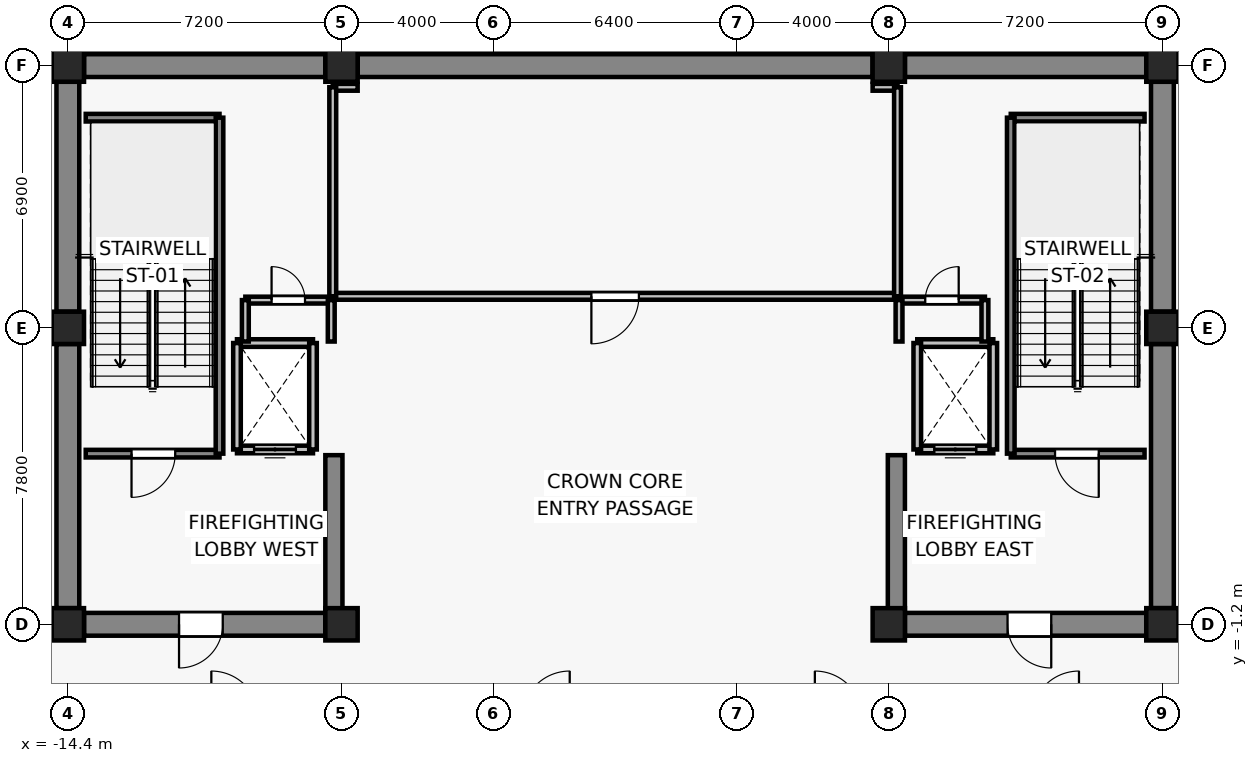
"""IFC4 building model, lengths in metres.
Left out: names, types, materials, properties, quantities, classifications, styles, units other than length and angle.
Written with IfcOpenShell. Run it as: python <this file> out.ifc"""

import sys

from ifc_helpers import new_model, si_unit, direction, frame, frame_2d, origin, origin_2d, place, context, subcontext, project, spatial, rectangle, extrude, source, transform, mapped, element, fill, save


model = new_model("IFC4")
c1 = context("Model", 3, precision=1e-05, world=origin(), true_north=direction((0.0, 1.0)))
c2 = subcontext(c1, "Body", "Model", "MODEL_VIEW")
j1 = project(units=[si_unit("LENGTHUNIT", "METRE"), si_unit("PLANEANGLEUNIT", "RADIAN")], contexts=[c1])
p1 = place(None, origin())
s1 = spatial("IfcSite", under=j1, at=p1, CompositionType="ELEMENT")
p2 = place(p1, origin())
s2 = spatial("IfcBuilding", under=s1, at=p2, CompositionType="ELEMENT")
p3 = place(p2, frame((0.0, 0.0, 276.2)))
s3 = spatial("IfcBuildingStorey", under=s2, at=p3, CompositionType="ELEMENT", Elevation=276.2)
for number, where, z_axis, x_axis in (
    (1, (-14.4, -1.2, 0.0), (0.0, 0.0, 1.0), (1.0, 0.0, 0.0)),
    (2, (-7.2, -1.2, 0.0), (0.0, 0.0, 1.0), (1.0, 0.0, 0.0)),
    (3, (7.2, -1.2, 0.0), (0.0, 0.0, 1.0), (1.0, 0.0, 0.0)),
    (4, (14.4, -1.2, 0.0), (0.0, 0.0, 1.0), (1.0, 0.0, 0.0)),
    (5, (-14.4, 6.6, 0.0), (0.0, 0.0, 1.0), (1.0, 0.0, 0.0)),
    (6, (14.4, 6.6, 0.0), (0.0, 0.0, 1.0), (1.0, 0.0, 0.0)),
    (7, (-14.4, 13.5, 0.0), (0.0, 0.0, 1.0), (1.0, 0.0, 0.0)),
    (8, (-7.2, 13.5, 0.0), (0.0, 0.0, 1.0), (1.0, 0.0, 0.0)),
    (9, (7.2, 13.5, 0.0), (0.0, 0.0, 1.0), (1.0, 0.0, 0.0)),
    (10, (14.4, 13.5, 0.0), (0.0, 0.0, 1.0), (1.0, 0.0, 0.0)),
):
    element("IfcColumn", number, at=place(p3, frame(where, z_axis=z_axis, x_axis=x_axis)), inside=s3, PredefinedType="COLUMN", context=c2, shape_type="SweptSolid", body=[
        extrude(rectangle(XDim=0.85, YDim=0.85, at=origin_2d()), origin(), (0.0, 0.0, 1.0), 4.6),
    ])
p4 = place(p3, frame((-13.975, 13.5, 0.0), z_axis=(0.0, 0.0, 1.0), x_axis=(1.0, 0.0, 0.0)))
e11 = element("IfcWall", 11, at=p4, inside=s3, PredefinedType="SHEAR", context=c2, shape_type="SweptSolid", body=[
    extrude(rectangle(XDim=6.35, YDim=0.6, at=frame_2d((3.175, 0.0))), origin(), (0.0, 0.0, 1.0), 4.38),
])
p5 = place(p3, frame((-6.775, 13.5, 0.0), z_axis=(0.0, 0.0, 1.0), x_axis=(1.0, 0.0, 0.0)))
e12 = element("IfcWall", 12, at=p5, inside=s3, PredefinedType="SHEAR", context=c2, shape_type="SweptSolid", body=[
    extrude(rectangle(XDim=13.55, YDim=0.6, at=frame_2d((6.775, 0.0))), origin(), (0.0, 0.0, 1.0), 4.38),
])
p6 = place(p3, frame((7.625, 13.5, 0.0), z_axis=(0.0, 0.0, 1.0), x_axis=(1.0, 0.0, 0.0)))
e13 = element("IfcWall", 13, at=p6, inside=s3, PredefinedType="SHEAR", context=c2, shape_type="SweptSolid", body=[
    extrude(rectangle(XDim=6.35, YDim=0.6, at=frame_2d((3.175, 0.0))), origin(), (0.0, 0.0, 1.0), 4.38),
])
p7 = place(p3, frame((-14.4, -0.775, 0.0), z_axis=(0.0, 0.0, 1.0), x_axis=(0.0, 1.0, 0.0)))
e14 = element("IfcWall", 14, at=p7, inside=s3, PredefinedType="SHEAR", context=c2, shape_type="SweptSolid", body=[
    extrude(rectangle(XDim=6.95, YDim=0.6, at=frame_2d((3.475, 0.0))), origin(), (0.0, 0.0, 1.0), 4.38),
])
p8 = place(p3, frame((-14.4, 7.025, 0.0), z_axis=(0.0, 0.0, 1.0), x_axis=(0.0, 1.0, 0.0)))
e15 = element("IfcWall", 15, at=p8, inside=s3, PredefinedType="SHEAR", context=c2, shape_type="SweptSolid", body=[
    extrude(rectangle(XDim=6.05, YDim=0.6, at=frame_2d((3.025, 0.0))), origin(), (0.0, 0.0, 1.0), 4.38),
])
p9 = place(p3, frame((14.4, -0.775, 0.0), z_axis=(0.0, 0.0, 1.0), x_axis=(0.0, 1.0, 0.0)))
e16 = element("IfcWall", 16, at=p9, inside=s3, PredefinedType="SHEAR", context=c2, shape_type="SweptSolid", body=[
    extrude(rectangle(XDim=6.95, YDim=0.6, at=frame_2d((3.475, 0.0))), origin(), (0.0, 0.0, 1.0), 4.38),
])
p10 = place(p3, frame((14.4, 7.025, 0.0), z_axis=(0.0, 0.0, 1.0), x_axis=(0.0, 1.0, 0.0)))
e17 = element("IfcWall", 17, at=p10, inside=s3, PredefinedType="SHEAR", context=c2, shape_type="SweptSolid", body=[
    extrude(rectangle(XDim=6.05, YDim=0.6, at=frame_2d((3.025, 0.0))), origin(), (0.0, 0.0, 1.0), 4.38),
])
p11 = place(p3, frame((-7.625, -1.2, 0.0), z_axis=(0.0, 0.0, 1.0), x_axis=(-1.0, 0.0, 0.0)))
e18 = element("IfcWall", 18, at=p11, inside=s3, PredefinedType="SHEAR", context=c2, shape_type="SweptSolid", body=[
    extrude(rectangle(XDim=6.35, YDim=0.6, at=frame_2d((3.175, 0.0))), origin(), (0.0, 0.0, 1.0), 4.38),
])
p12 = place(p11, frame((2.7, 0.0, 0.0)))
e19 = element("IfcOpeningElement", 19, at=p12, cuts=e18, PredefinedType="OPENING", context=c2, shape_type="SweptSolid", body=[
    extrude(rectangle(XDim=1.15, YDim=2.15, at=frame_2d((0.575, 1.075))), frame((0.0, 0.31, 0.0), z_axis=(0.0, -1.0, 0.0), x_axis=(1.0, 0.0, 0.0)), (0.0, 0.0, 1.0), 0.62),
])
p13 = place(p3, frame((13.975, -1.2, 0.0), z_axis=(0.0, 0.0, 1.0), x_axis=(-1.0, 0.0, 0.0)))
e20 = element("IfcWall", 20, at=p13, inside=s3, PredefinedType="SHEAR", context=c2, shape_type="SweptSolid", body=[
    extrude(rectangle(XDim=6.35, YDim=0.6, at=frame_2d((3.175, 0.0))), origin(), (0.0, 0.0, 1.0), 4.38),
])
p14 = place(p13, frame((2.5, 0.0, 0.0)))
e21 = element("IfcOpeningElement", 21, at=p14, cuts=e20, PredefinedType="OPENING", context=c2, shape_type="SweptSolid", body=[
    extrude(rectangle(XDim=1.15, YDim=2.15, at=frame_2d((0.575, 1.075))), frame((0.0, 0.31, 0.0), z_axis=(0.0, -1.0, 0.0), x_axis=(1.0, 0.0, 0.0)), (0.0, 0.0, 1.0), 0.62),
])
for number, where, z_axis, x_axis in (
    (22, (-7.4, -0.9, 0.0), (0.0, 0.0, 1.0), (0.0, 1.0, 0.0)),
    (23, (7.4, -0.9, 0.0), (0.0, 0.0, 1.0), (0.0, 1.0, 0.0)),
):
    element("IfcWall", number, at=place(p3, frame(where, z_axis=z_axis, x_axis=x_axis)), inside=s3, PredefinedType="SHEAR", context=c2, shape_type="SweptSolid", body=[
        extrude(rectangle(XDim=4.15, YDim=0.45, at=frame_2d((2.075, 0.0))), origin(), (0.0, 0.0, 1.0), 4.38),
    ])
p15 = place(p3, frame((-7.95, 3.4, 0.0), z_axis=(0.0, 0.0, 1.0), x_axis=(-1.0, 0.0, 0.0)))
e24 = element("IfcWall", 24, at=p15, inside=s3, PredefinedType="SOLIDWALL", context=c2, shape_type="SweptSolid", body=[
    extrude(rectangle(XDim=2.0, YDim=0.2, at=frame_2d((1.0, 0.0))), origin(), (0.0, 0.0, 1.0), 4.38),
])
p16 = place(p15, frame((0.45, 0.0, 0.0)))
e25 = element("IfcOpeningElement", 25, at=p16, cuts=e24, PredefinedType="OPENING", context=c2, shape_type="SweptSolid", body=[
    extrude(rectangle(XDim=1.1, YDim=2.2, at=frame_2d((0.55, 1.1))), frame((0.0, 0.11, 0.0), z_axis=(0.0, -1.0, 0.0), x_axis=(1.0, 0.0, 0.0)), (0.0, 0.0, 1.0), 0.22),
])
p17 = place(p3, frame((-9.95, 6.2, 0.0), z_axis=(0.0, 0.0, 1.0), x_axis=(1.0, 0.0, 0.0)))
e26 = element("IfcWall", 26, at=p17, inside=s3, PredefinedType="SOLIDWALL", context=c2, shape_type="SweptSolid", body=[
    extrude(rectangle(XDim=2.0, YDim=0.2, at=frame_2d((1.0, 0.0))), origin(), (0.0, 0.0, 1.0), 4.38),
])
for number, where, z_axis, x_axis in (
    (27, (-9.95, 3.4, 0.0), (0.0, 0.0, 1.0), (0.0, 1.0, 0.0)),
    (28, (-7.95, 6.2, 0.0), (0.0, 0.0, 1.0), (0.0, -1.0, 0.0)),
):
    element("IfcWall", number, at=place(p3, frame(where, z_axis=z_axis, x_axis=x_axis)), inside=s3, PredefinedType="SOLIDWALL", context=c2, shape_type="SweptSolid", body=[
        extrude(rectangle(XDim=2.8, YDim=0.2, at=frame_2d((1.4, 0.0))), origin(), (0.0, 0.0, 1.0), 4.38),
    ])
p18 = place(p3, frame((9.95, 3.4, 0.0), z_axis=(0.0, 0.0, 1.0), x_axis=(-1.0, 0.0, 0.0)))
e29 = element("IfcWall", 29, at=p18, inside=s3, PredefinedType="SOLIDWALL", context=c2, shape_type="SweptSolid", body=[
    extrude(rectangle(XDim=2.0, YDim=0.2, at=frame_2d((1.0, 0.0))), origin(), (0.0, 0.0, 1.0), 4.38),
])
p19 = place(p18, frame((0.45, 0.0, 0.0)))
e30 = element("IfcOpeningElement", 30, at=p19, cuts=e29, PredefinedType="OPENING", context=c2, shape_type="SweptSolid", body=[
    extrude(rectangle(XDim=1.1, YDim=2.2, at=frame_2d((0.55, 1.1))), frame((0.0, 0.11, 0.0), z_axis=(0.0, -1.0, 0.0), x_axis=(1.0, 0.0, 0.0)), (0.0, 0.0, 1.0), 0.22),
])
p20 = place(p3, frame((7.95, 6.2, 0.0), z_axis=(0.0, 0.0, 1.0), x_axis=(1.0, 0.0, 0.0)))
e31 = element("IfcWall", 31, at=p20, inside=s3, PredefinedType="SOLIDWALL", context=c2, shape_type="SweptSolid", body=[
    extrude(rectangle(XDim=2.0, YDim=0.2, at=frame_2d((1.0, 0.0))), origin(), (0.0, 0.0, 1.0), 4.38),
])
for number, where, z_axis, x_axis in (
    (32, (7.95, 3.4, 0.0), (0.0, 0.0, 1.0), (0.0, 1.0, 0.0)),
    (33, (9.95, 6.2, 0.0), (0.0, 0.0, 1.0), (0.0, -1.0, 0.0)),
):
    element("IfcWall", number, at=place(p3, frame(where, z_axis=z_axis, x_axis=x_axis)), inside=s3, PredefinedType="SOLIDWALL", context=c2, shape_type="SweptSolid", body=[
        extrude(rectangle(XDim=2.8, YDim=0.2, at=frame_2d((1.4, 0.0))), origin(), (0.0, 0.0, 1.0), 4.38),
    ])
p21 = place(p3, frame((-10.41, 3.29, 0.0), z_axis=(0.0, 0.0, 1.0), x_axis=(-1.0, 0.0, 0.0)))
e34 = element("IfcWall", 34, at=p21, inside=s3, PredefinedType="SOLIDWALL", context=c2, shape_type="SweptSolid", body=[
    extrude(rectangle(XDim=3.52, YDim=0.2, at=frame_2d((1.76, 0.0))), origin(), (0.0, 0.0, 1.0), 4.38),
])
p22 = place(p21, frame((1.165, 0.0, 0.0)))
e35 = element("IfcOpeningElement", 35, at=p22, cuts=e34, PredefinedType="OPENING", context=c2, shape_type="SweptSolid", body=[
    extrude(rectangle(XDim=1.15, YDim=2.15, at=frame_2d((0.575, 1.075))), frame((0.0, 0.11, 0.0), z_axis=(0.0, -1.0, 0.0), x_axis=(1.0, 0.0, 0.0)), (0.0, 0.0, 1.0), 0.22),
])
p23 = place(p3, frame((-13.93, 12.13, 0.0), z_axis=(0.0, 0.0, 1.0), x_axis=(1.0, 0.0, 0.0)))
e36 = element("IfcWall", 36, at=p23, inside=s3, PredefinedType="SOLIDWALL", context=c2, shape_type="SweptSolid", body=[
    extrude(rectangle(XDim=3.52, YDim=0.2, at=frame_2d((1.76, 0.0))), origin(), (0.0, 0.0, 1.0), 4.38),
])
p24 = place(p3, frame((-10.41, 12.13, 0.0), z_axis=(0.0, 0.0, 1.0), x_axis=(0.0, -1.0, 0.0)))
e37 = element("IfcWall", 37, at=p24, inside=s3, PredefinedType="SOLIDWALL", context=c2, shape_type="SweptSolid", body=[
    extrude(rectangle(XDim=8.84, YDim=0.2, at=frame_2d((4.42, 0.0))), origin(), (0.0, 0.0, 1.0), 4.38),
])
p25 = place(p3, frame((13.93, 3.29, 0.0), z_axis=(0.0, 0.0, 1.0), x_axis=(-1.0, 0.0, 0.0)))
e38 = element("IfcWall", 38, at=p25, inside=s3, PredefinedType="SOLIDWALL", context=c2, shape_type="SweptSolid", body=[
    extrude(rectangle(XDim=3.52, YDim=0.2, at=frame_2d((1.76, 0.0))), origin(), (0.0, 0.0, 1.0), 4.38),
])
p26 = place(p25, frame((1.205, 0.0, 0.0)))
e39 = element("IfcOpeningElement", 39, at=p26, cuts=e38, PredefinedType="OPENING", context=c2, shape_type="SweptSolid", body=[
    extrude(rectangle(XDim=1.15, YDim=2.15, at=frame_2d((0.575, 1.075))), frame((0.0, 0.11, 0.0), z_axis=(0.0, -1.0, 0.0), x_axis=(1.0, 0.0, 0.0)), (0.0, 0.0, 1.0), 0.22),
])
p27 = place(p3, frame((10.41, 12.13, 0.0), z_axis=(0.0, 0.0, 1.0), x_axis=(1.0, 0.0, 0.0)))
e40 = element("IfcWall", 40, at=p27, inside=s3, PredefinedType="SOLIDWALL", context=c2, shape_type="SweptSolid", body=[
    extrude(rectangle(XDim=3.52, YDim=0.2, at=frame_2d((1.76, 0.0))), origin(), (0.0, 0.0, 1.0), 4.38),
])
p28 = place(p3, frame((10.41, 3.29, 0.0), z_axis=(0.0, 0.0, 1.0), x_axis=(0.0, 1.0, 0.0)))
e41 = element("IfcWall", 41, at=p28, inside=s3, PredefinedType="SOLIDWALL", context=c2, shape_type="SweptSolid", body=[
    extrude(rectangle(XDim=8.84, YDim=0.2, at=frame_2d((4.42, 0.0))), origin(), (0.0, 0.0, 1.0), 4.38),
])
p29 = place(p3, frame((7.43, 7.43, 0.0), z_axis=(0.0, 0.0, 1.0), x_axis=(-1.0, 0.0, 0.0)))
e42 = element("IfcWall", 42, at=p29, inside=s3, PredefinedType="PARTITIONING", context=c2, shape_type="SweptSolid", body=[
    extrude(rectangle(XDim=14.86, YDim=0.18, at=frame_2d((7.43, 0.0))), origin(), (0.0, 0.0, 1.0), 3.77),
])
p30 = place(p29, frame((6.805, 0.0, 0.0)))
e43 = element("IfcOpeningElement", 43, at=p30, cuts=e42, PredefinedType="OPENING", context=c2, shape_type="SweptSolid", body=[
    extrude(rectangle(XDim=1.25, YDim=2.15, at=frame_2d((0.625, 1.075))), frame((0.0, 0.1, 0.0), z_axis=(0.0, -1.0, 0.0), x_axis=(1.0, 0.0, 0.0)), (0.0, 0.0, 1.0), 0.2),
])
for number, where, z_axis, x_axis in (
    (44, (-7.43, 12.93, 0.0), (0.0, 0.0, 1.0), (1.0, 0.0, 0.0)),
    (45, (6.775, 12.93, 0.0), (0.0, 0.0, 1.0), (1.0, 0.0, 0.0)),
):
    element("IfcWall", number, at=place(p3, frame(where, z_axis=z_axis, x_axis=x_axis)), inside=s3, PredefinedType="PARTITIONING", context=c2, shape_type="SweptSolid", body=[
        extrude(rectangle(XDim=0.655, YDim=0.18, at=frame_2d((0.328, 0.0))), origin(), (0.0, 0.0, 1.0), 3.77),
    ])
for number, where, z_axis, x_axis in (
    (46, (-7.43, 7.43, 0.0), (0.0, 0.0, 1.0), (0.0, 1.0, 0.0)),
    (47, (7.43, 12.93, 0.0), (0.0, 0.0, 1.0), (0.0, -1.0, 0.0)),
):
    element("IfcWall", number, at=place(p3, frame(where, z_axis=z_axis, x_axis=x_axis)), inside=s3, PredefinedType="PARTITIONING", context=c2, shape_type="SweptSolid", body=[
        extrude(rectangle(XDim=5.5, YDim=0.18, at=frame_2d((2.75, 0.0))), origin(), (0.0, 0.0, 1.0), 3.77),
    ])
p31 = place(p3, frame((-9.73, 7.33, 0.0), z_axis=(0.0, 0.0, 1.0), x_axis=(1.0, 0.0, 0.0)))
e48 = element("IfcWall", 48, at=p31, inside=s3, PredefinedType="PARTITIONING", context=c2, shape_type="SweptSolid", body=[
    extrude(rectangle(XDim=2.26, YDim=0.18, at=frame_2d((1.13, 0.0))), origin(), (0.0, 0.0, 1.0), 3.77),
])
p32 = place(p31, frame((0.69, 0.0, 0.0)))
e49 = element("IfcOpeningElement", 49, at=p32, cuts=e48, PredefinedType="OPENING", context=c2, shape_type="SweptSolid", body=[
    extrude(rectangle(XDim=0.88, YDim=2.1, at=frame_2d((0.44, 1.05))), frame((0.0, 0.1, 0.0), z_axis=(0.0, -1.0, 0.0), x_axis=(1.0, 0.0, 0.0)), (0.0, 0.0, 1.0), 0.2),
])
p33 = place(p3, frame((-9.73, 6.24, 0.0), z_axis=(0.0, 0.0, 1.0), x_axis=(0.0, 1.0, 0.0)))
e50 = element("IfcWall", 50, at=p33, inside=s3, PredefinedType="PARTITIONING", context=c2, shape_type="SweptSolid", body=[
    extrude(rectangle(XDim=1.09, YDim=0.18, at=frame_2d((0.545, 0.0))), origin(), (0.0, 0.0, 1.0), 4.38),
])
p34 = place(p3, frame((-7.47, 7.33, 0.0), z_axis=(0.0, 0.0, 1.0), x_axis=(0.0, -1.0, 0.0)))
e51 = element("IfcWall", 51, at=p34, inside=s3, PredefinedType="PARTITIONING", context=c2, shape_type="SweptSolid", body=[
    extrude(rectangle(XDim=1.09, YDim=0.18, at=frame_2d((0.545, 0.0))), origin(), (0.0, 0.0, 1.0), 3.77),
])
p35 = place(p3, frame((7.47, 7.33, 0.0), z_axis=(0.0, 0.0, 1.0), x_axis=(1.0, 0.0, 0.0)))
e52 = element("IfcWall", 52, at=p35, inside=s3, PredefinedType="PARTITIONING", context=c2, shape_type="SweptSolid", body=[
    extrude(rectangle(XDim=2.26, YDim=0.18, at=frame_2d((1.13, 0.0))), origin(), (0.0, 0.0, 1.0), 3.77),
])
p36 = place(p35, frame((0.69, 0.0, 0.0)))
e53 = element("IfcOpeningElement", 53, at=p36, cuts=e52, PredefinedType="OPENING", context=c2, shape_type="SweptSolid", body=[
    extrude(rectangle(XDim=0.88, YDim=2.1, at=frame_2d((0.44, 1.05))), frame((0.0, 0.1, 0.0), z_axis=(0.0, -1.0, 0.0), x_axis=(1.0, 0.0, 0.0)), (0.0, 0.0, 1.0), 0.2),
])
p37 = place(p3, frame((7.47, 6.24, 0.0), z_axis=(0.0, 0.0, 1.0), x_axis=(0.0, 1.0, 0.0)))
e54 = element("IfcWall", 54, at=p37, inside=s3, PredefinedType="PARTITIONING", context=c2, shape_type="SweptSolid", body=[
    extrude(rectangle(XDim=1.09, YDim=0.18, at=frame_2d((0.545, 0.0))), origin(), (0.0, 0.0, 1.0), 3.77),
])
p38 = place(p3, frame((9.73, 7.33, 0.0), z_axis=(0.0, 0.0, 1.0), x_axis=(0.0, -1.0, 0.0)))
e55 = element("IfcWall", 55, at=p38, inside=s3, PredefinedType="PARTITIONING", context=c2, shape_type="SweptSolid", body=[
    extrude(rectangle(XDim=1.09, YDim=0.18, at=frame_2d((0.545, 0.0))), origin(), (0.0, 0.0, 1.0), 4.38),
])
m1 = source(origin(), c2, "Body", "SweptSolid", [
    extrude(rectangle(XDim=1.1, YDim=2.2, at=frame_2d((0.55, 1.1))), frame((0.0, 0.025, 0.0), z_axis=(0.0, -1.0, 0.0), x_axis=(1.0, 0.0, 0.0)), (0.0, 0.0, 1.0), 0.05),
])
p39 = place(p16, origin())
e56 = element("IfcDoor", 56, at=p39, inside=s3, OperationType="DOUBLE_DOOR_SLIDING", PredefinedType="DOOR", context=c2, shape_type="MappedRepresentation", body=[
    mapped(m1, transform((0.0, 0.0, 0.0), x_axis=(1.0, 0.0, 0.0), y_axis=(0.0, 1.0, 0.0), z_axis=(0.0, 0.0, 1.0), scale=1.0)),
])
fill(e25, e56)
p40 = place(p19, origin())
e57 = element("IfcDoor", 57, at=p40, inside=s3, OperationType="DOUBLE_DOOR_SLIDING", PredefinedType="DOOR", context=c2, shape_type="MappedRepresentation", body=[
    mapped(m1, transform((0.0, 0.0, 0.0), x_axis=(1.0, 0.0, 0.0), y_axis=(0.0, 1.0, 0.0), z_axis=(0.0, 0.0, 1.0), scale=1.0)),
])
fill(e30, e57)
m2 = source(origin(), c2, "Body", "SweptSolid", [
    extrude(rectangle(XDim=1.15, YDim=2.15, at=frame_2d((0.575, 1.075))), frame((0.0, 0.025, 0.0), z_axis=(0.0, -1.0, 0.0), x_axis=(1.0, 0.0, 0.0)), (0.0, 0.0, 1.0), 0.05),
])
p41 = place(p22, origin())
e58 = element("IfcDoor", 58, at=p41, inside=s3, OperationType="SINGLE_SWING_RIGHT", PredefinedType="DOOR", context=c2, shape_type="MappedRepresentation", body=[
    mapped(m2, transform((0.0, 0.0, 0.0), x_axis=(1.0, 0.0, 0.0), y_axis=(0.0, 1.0, 0.0), z_axis=(0.0, 0.0, 1.0), scale=1.0)),
])
fill(e35, e58)
p42 = place(p26, origin())
e59 = element("IfcDoor", 59, at=p42, inside=s3, OperationType="SINGLE_SWING_LEFT", PredefinedType="DOOR", context=c2, shape_type="MappedRepresentation", body=[
    mapped(m2, transform((0.0, 0.0, 0.0), x_axis=(1.0, 0.0, 0.0), y_axis=(0.0, 1.0, 0.0), z_axis=(0.0, 0.0, 1.0), scale=1.0)),
])
fill(e39, e59)
p43 = place(p12, origin())
e60 = element("IfcDoor", 60, at=p43, inside=s3, OperationType="SINGLE_SWING_RIGHT", PredefinedType="DOOR", context=c2, shape_type="MappedRepresentation", body=[
    mapped(m2, transform((0.0, 0.0, 0.0), x_axis=(1.0, 0.0, 0.0), y_axis=(0.0, 1.0, 0.0), z_axis=(0.0, 0.0, 1.0), scale=1.0)),
])
fill(e19, e60)
p44 = place(p14, origin())
e61 = element("IfcDoor", 61, at=p44, inside=s3, OperationType="SINGLE_SWING_LEFT", PredefinedType="DOOR", context=c2, shape_type="MappedRepresentation", body=[
    mapped(m2, transform((0.0, 0.0, 0.0), x_axis=(1.0, 0.0, 0.0), y_axis=(0.0, 1.0, 0.0), z_axis=(0.0, 0.0, 1.0), scale=1.0)),
])
fill(e21, e61)
m3 = source(origin(), c2, "Body", "SweptSolid", [
    extrude(rectangle(XDim=1.25, YDim=2.15, at=frame_2d((0.625, 1.075))), frame((0.0, 0.025, 0.0), z_axis=(0.0, -1.0, 0.0), x_axis=(1.0, 0.0, 0.0)), (0.0, 0.0, 1.0), 0.05),
])
p45 = place(p30, origin())
e62 = element("IfcDoor", 62, at=p45, inside=s3, OperationType="SINGLE_SWING_RIGHT", PredefinedType="DOOR", context=c2, shape_type="MappedRepresentation", body=[
    mapped(m3, transform((0.0, 0.0, 0.0), x_axis=(1.0, 0.0, 0.0), y_axis=(0.0, 1.0, 0.0), z_axis=(0.0, 0.0, 1.0), scale=1.0)),
])
fill(e43, e62)
m4 = source(origin(), c2, "Body", "SweptSolid", [
    extrude(rectangle(XDim=0.88, YDim=2.1, at=frame_2d((0.44, 1.05))), frame((0.0, 0.025, 0.0), z_axis=(0.0, -1.0, 0.0), x_axis=(1.0, 0.0, 0.0)), (0.0, 0.0, 1.0), 0.05),
])
p46 = place(p32, origin())
e63 = element("IfcDoor", 63, at=p46, inside=s3, OperationType="SINGLE_SWING_LEFT", PredefinedType="DOOR", context=c2, shape_type="MappedRepresentation", body=[
    mapped(m4, transform((0.0, 0.0, 0.0), x_axis=(1.0, 0.0, 0.0), y_axis=(0.0, 1.0, 0.0), z_axis=(0.0, 0.0, 1.0), scale=1.0)),
])
fill(e49, e63)
p47 = place(p36, origin())
e64 = element("IfcDoor", 64, at=p47, inside=s3, OperationType="SINGLE_SWING_RIGHT", PredefinedType="DOOR", context=c2, shape_type="MappedRepresentation", body=[
    mapped(m4, transform((0.0, 0.0, 0.0), x_axis=(1.0, 0.0, 0.0), y_axis=(0.0, 1.0, 0.0), z_axis=(0.0, 0.0, 1.0), scale=1.0)),
])
fill(e53, e64)
save(model, sys.argv[1])
